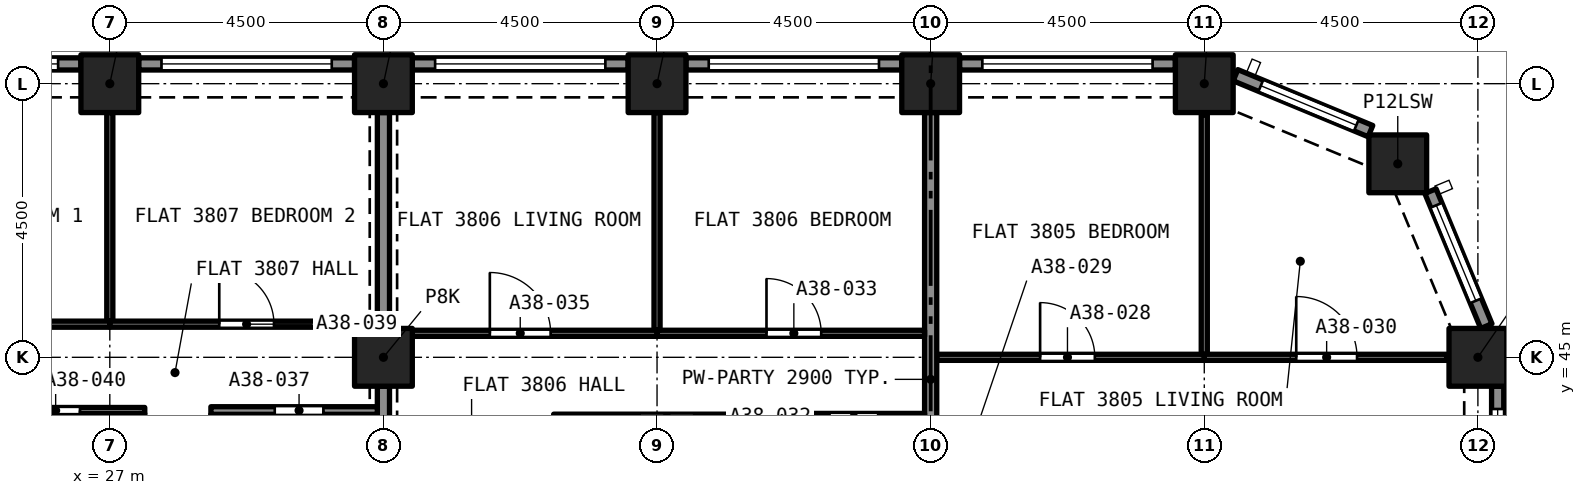
"""IFC4 building model, lengths in metres.
Left out: names, types, materials, properties, quantities, classifications, styles, units other than length and angle.
Written with IfcOpenShell. Run it as: python <this file> out.ifc"""

import sys

from ifc_helpers import new_model, si_unit, direction, frame, frame_2d, origin, origin_2d, place, context, subcontext, project, spatial, rectangle, extrude, element, fill, save


model = new_model("IFC4")
c1 = context("Model", 3, precision=1e-05, world=origin(), true_north=direction((0.0, 1.0)))
c2 = subcontext(c1, "Body", "Model", "MODEL_VIEW")
j1 = project(units=[si_unit("LENGTHUNIT", "METRE"), si_unit("PLANEANGLEUNIT", "RADIAN")], contexts=[c1])
p1 = place(None, origin())
s1 = spatial("IfcSite", under=j1, at=p1, CompositionType="ELEMENT")
p2 = place(p1, origin())
s2 = spatial("IfcBuilding", under=s1, at=p2, CompositionType="ELEMENT")
p3 = place(p2, frame((0.0, 0.0, 136.6)))
s3 = spatial("IfcBuildingStorey", under=s2, at=p3, CompositionType="ELEMENT", Elevation=136.6)
for number, where, z_axis, x_axis in (
    (1, (31.5, 45.0, 0.0), (0.0, 0.0, 1.0), (1.0, 0.0, 0.0)),
    (2, (49.5, 45.0, 0.0), (0.0, 0.0, 1.0), (1.0, 0.0, 0.0)),
    (3, (48.182, 48.182, 0.0), (0.0, 0.0, 1.0), (1.0, 0.0, 0.0)),
    (4, (27.0, 49.5, 0.0), (0.0, 0.0, 1.0), (1.0, 0.0, 0.0)),
    (5, (31.5, 49.5, 0.0), (0.0, 0.0, 1.0), (1.0, 0.0, 0.0)),
    (6, (36.0, 49.5, 0.0), (0.0, 0.0, 1.0), (1.0, 0.0, 0.0)),
    (7, (40.5, 49.5, 0.0), (0.0, 0.0, 1.0), (1.0, 0.0, 0.0)),
    (8, (45.0, 49.5, 0.0), (0.0, 0.0, 1.0), (1.0, 0.0, 0.0)),
):
    element("IfcColumn", number, at=place(p3, frame(where, z_axis=z_axis, x_axis=x_axis)), inside=s3, PredefinedType="COLUMN", context=c2, shape_type="SweptSolid", body=[
        extrude(rectangle(XDim=0.95, YDim=0.95, at=origin_2d()), origin(), (0.0, 0.0, 1.0), 3.2),
    ])
p4 = place(p3, frame((49.825, 44.525, 0.0), z_axis=(0.0, 0.0, 1.0), x_axis=(0.0, -1.0, 0.0)))
e9 = element("IfcWall", 9, at=p4, inside=s3, PredefinedType="SOLIDWALL", context=c2, shape_type="SweptSolid", body=[
    extrude(rectangle(XDim=3.55, YDim=0.2, at=frame_2d((1.775, 0.0))), origin(), (0.0, 0.0, 1.0), 3.2),
])
p5 = place(p4, frame((0.375, 0.0, 0.45)))
e10 = element("IfcOpeningElement", 10, at=p5, cuts=e9, PredefinedType="OPENING", context=c2, shape_type="SweptSolid", body=[
    extrude(rectangle(XDim=2.8, YDim=1.95, at=frame_2d((1.4, 0.975))), frame((0.0, 0.11, 0.0), z_axis=(0.0, -1.0, 0.0), x_axis=(1.0, 0.0, 0.0)), (0.0, 0.0, 1.0), 0.22),
])
p6 = place(p3, frame((48.72, 47.733, 0.0), z_axis=(0.0, 0.0, 1.0), x_axis=(0.382680855588, -0.923880599843, 0.0)))
e11 = element("IfcWall", 11, at=p6, inside=s3, PredefinedType="SOLIDWALL", context=c2, shape_type="SweptSolid", body=[
    extrude(rectangle(XDim=2.403, YDim=0.2, at=frame_2d((1.201, 0.0))), origin(), (0.0, 0.0, 1.0), 3.2),
])
p7 = place(p6, frame((0.251, 0.0, 0.45)))
e12 = element("IfcOpeningElement", 12, at=p7, cuts=e11, PredefinedType="OPENING", context=c2, shape_type="SweptSolid", body=[
    extrude(rectangle(XDim=1.7, YDim=1.95, at=frame_2d((0.85, 0.975))), frame((0.0, 0.11, 0.0), z_axis=(0.0, -1.0, 0.0), x_axis=(1.0, 0.0, 0.0)), (0.0, 0.0, 1.0), 0.22),
])
p8 = place(p3, frame((45.513, 49.639, 0.0), z_axis=(0.0, 0.0, 1.0), x_axis=(0.923880599843, -0.382680855588, 0.0)))
e13 = element("IfcWall", 13, at=p8, inside=s3, PredefinedType="SOLIDWALL", context=c2, shape_type="SweptSolid", body=[
    extrude(rectangle(XDim=2.403, YDim=0.2, at=frame_2d((1.201, 0.0))), origin(), (0.0, 0.0, 1.0), 3.2),
])
p9 = place(p8, frame((0.451, 0.0, 0.45)))
e14 = element("IfcOpeningElement", 14, at=p9, cuts=e13, PredefinedType="OPENING", context=c2, shape_type="SweptSolid", body=[
    extrude(rectangle(XDim=1.7, YDim=1.95, at=frame_2d((0.85, 0.975))), frame((0.0, 0.11, 0.0), z_axis=(0.0, -1.0, 0.0), x_axis=(1.0, 0.0, 0.0)), (0.0, 0.0, 1.0), 0.22),
])
p10 = place(p3, frame((40.975, 49.825, 0.0), z_axis=(0.0, 0.0, 1.0), x_axis=(1.0, 0.0, 0.0)))
e15 = element("IfcWall", 15, at=p10, inside=s3, PredefinedType="SOLIDWALL", context=c2, shape_type="SweptSolid", body=[
    extrude(rectangle(XDim=3.55, YDim=0.2, at=frame_2d((1.775, 0.0))), origin(), (0.0, 0.0, 1.0), 3.2),
])
p11 = place(p10, frame((0.375, 0.0, 0.45)))
e16 = element("IfcOpeningElement", 16, at=p11, cuts=e15, PredefinedType="OPENING", context=c2, shape_type="SweptSolid", body=[
    extrude(rectangle(XDim=2.8, YDim=1.95, at=frame_2d((1.4, 0.975))), frame((0.0, 0.11, 0.0), z_axis=(0.0, -1.0, 0.0), x_axis=(1.0, 0.0, 0.0)), (0.0, 0.0, 1.0), 0.22),
])
p12 = place(p3, frame((36.475, 49.825, 0.0), z_axis=(0.0, 0.0, 1.0), x_axis=(1.0, 0.0, 0.0)))
e17 = element("IfcWall", 17, at=p12, inside=s3, PredefinedType="SOLIDWALL", context=c2, shape_type="SweptSolid", body=[
    extrude(rectangle(XDim=3.55, YDim=0.2, at=frame_2d((1.775, 0.0))), origin(), (0.0, 0.0, 1.0), 3.2),
])
p13 = place(p12, frame((0.375, 0.0, 0.45)))
e18 = element("IfcOpeningElement", 18, at=p13, cuts=e17, PredefinedType="OPENING", context=c2, shape_type="SweptSolid", body=[
    extrude(rectangle(XDim=2.8, YDim=1.95, at=frame_2d((1.4, 0.975))), frame((0.0, 0.11, 0.0), z_axis=(0.0, -1.0, 0.0), x_axis=(1.0, 0.0, 0.0)), (0.0, 0.0, 1.0), 0.22),
])
p14 = place(p3, frame((31.975, 49.825, 0.0), z_axis=(0.0, 0.0, 1.0), x_axis=(1.0, 0.0, 0.0)))
e19 = element("IfcWall", 19, at=p14, inside=s3, PredefinedType="SOLIDWALL", context=c2, shape_type="SweptSolid", body=[
    extrude(rectangle(XDim=3.55, YDim=0.2, at=frame_2d((1.775, 0.0))), origin(), (0.0, 0.0, 1.0), 3.2),
])
p15 = place(p14, frame((0.375, 0.0, 0.45)))
e20 = element("IfcOpeningElement", 20, at=p15, cuts=e19, PredefinedType="OPENING", context=c2, shape_type="SweptSolid", body=[
    extrude(rectangle(XDim=2.8, YDim=1.95, at=frame_2d((1.4, 0.975))), frame((0.0, 0.11, 0.0), z_axis=(0.0, -1.0, 0.0), x_axis=(1.0, 0.0, 0.0)), (0.0, 0.0, 1.0), 0.22),
])
p16 = place(p3, frame((27.475, 49.825, 0.0), z_axis=(0.0, 0.0, 1.0), x_axis=(1.0, 0.0, 0.0)))
e21 = element("IfcWall", 21, at=p16, inside=s3, PredefinedType="SOLIDWALL", context=c2, shape_type="SweptSolid", body=[
    extrude(rectangle(XDim=3.55, YDim=0.2, at=frame_2d((1.775, 0.0))), origin(), (0.0, 0.0, 1.0), 3.2),
])
p17 = place(p16, frame((0.375, 0.0, 0.45)))
e22 = element("IfcOpeningElement", 22, at=p17, cuts=e21, PredefinedType="OPENING", context=c2, shape_type="SweptSolid", body=[
    extrude(rectangle(XDim=2.8, YDim=1.95, at=frame_2d((1.4, 0.975))), frame((0.0, 0.11, 0.0), z_axis=(0.0, -1.0, 0.0), x_axis=(1.0, 0.0, 0.0)), (0.0, 0.0, 1.0), 0.22),
])
p18 = place(p3, frame((22.975, 49.825, 0.0), z_axis=(0.0, 0.0, 1.0), x_axis=(1.0, 0.0, 0.0)))
e23 = element("IfcWall", 23, at=p18, inside=s3, PredefinedType="SOLIDWALL", context=c2, shape_type="SweptSolid", body=[
    extrude(rectangle(XDim=3.55, YDim=0.2, at=frame_2d((1.775, 0.0))), origin(), (0.0, 0.0, 1.0), 3.2),
])
p19 = place(p18, frame((0.375, 0.0, 0.45)))
e24 = element("IfcOpeningElement", 24, at=p19, cuts=e23, PredefinedType="OPENING", context=c2, shape_type="SweptSolid", body=[
    extrude(rectangle(XDim=2.8, YDim=1.95, at=frame_2d((1.4, 0.975))), frame((0.0, 0.11, 0.0), z_axis=(0.0, -1.0, 0.0), x_axis=(1.0, 0.0, 0.0)), (0.0, 0.0, 1.0), 0.22),
])
p20 = place(p3, frame((40.6, 45.0, 0.0), z_axis=(0.0, 0.0, 1.0), x_axis=(1.0, 0.0, 0.0)))
e25 = element("IfcWall", 25, at=p20, inside=s3, PredefinedType="PARTITIONING", context=c2, shape_type="SweptSolid", body=[
    extrude(rectangle(XDim=4.4, YDim=0.1, at=frame_2d((2.2, 0.0))), origin(), (0.0, 0.0, 1.0), 2.9),
])
p21 = place(p20, frame((1.7, 0.0, 0.0)))
e26 = element("IfcOpeningElement", 26, at=p21, cuts=e25, PredefinedType="OPENING", context=c2, shape_type="SweptSolid", body=[
    extrude(rectangle(XDim=0.9, YDim=2.1, at=frame_2d((0.45, 1.05))), frame((0.0, 0.06, 0.0), z_axis=(0.0, -1.0, 0.0), x_axis=(1.0, 0.0, 0.0)), (0.0, 0.0, 1.0), 0.12),
])
p22 = place(p3, frame((45.0, 45.05, 0.0), z_axis=(0.0, 0.0, 1.0), x_axis=(0.0, 1.0, 0.0)))
e27 = element("IfcWall", 27, at=p22, inside=s3, PredefinedType="PARTITIONING", context=c2, shape_type="SweptSolid", body=[
    extrude(rectangle(XDim=3.936, YDim=0.1, at=frame_2d((1.968, 0.0))), origin(), (0.0, 0.0, 1.0), 2.9),
])
p23 = place(p3, frame((45.0, 45.0, 0.0), z_axis=(0.0, 0.0, 1.0), x_axis=(1.0, 0.0, 0.0)))
e28 = element("IfcWall", 28, at=p23, inside=s3, PredefinedType="PARTITIONING", context=c2, shape_type="SweptSolid", body=[
    extrude(rectangle(XDim=3.986, YDim=0.1, at=frame_2d((1.993, 0.0))), origin(), (0.0, 0.0, 1.0), 2.9),
])
p24 = place(p23, frame((1.512, 0.0, 0.0)))
e29 = element("IfcOpeningElement", 29, at=p24, cuts=e28, PredefinedType="OPENING", context=c2, shape_type="SweptSolid", body=[
    extrude(rectangle(XDim=1.0, YDim=2.1, at=frame_2d((0.5, 1.05))), frame((0.0, 0.06, 0.0), z_axis=(0.0, -1.0, 0.0), x_axis=(1.0, 0.0, 0.0)), (0.0, 0.0, 1.0), 0.12),
])
p25 = place(p3, frame((40.5, 40.25, 0.0), z_axis=(0.0, 0.0, 1.0), x_axis=(0.0, 1.0, 0.0)))
e30 = element("IfcWall", 30, at=p25, inside=s3, PredefinedType="PARTITIONING", context=c2, shape_type="SweptSolid", body=[
    extrude(rectangle(XDim=8.775, YDim=0.2, at=frame_2d((4.387, 0.0))), origin(), (0.0, 0.0, 1.0), 2.9),
])
p26 = place(p3, frame((40.4, 44.015, 0.0), z_axis=(0.0, 0.0, 1.0), x_axis=(-1.0, 0.0, 0.0)))
e31 = element("IfcWall", 31, at=p26, inside=s3, PredefinedType="PARTITIONING", context=c2, shape_type="SweptSolid", body=[
    extrude(rectangle(XDim=2.427, YDim=0.125, at=frame_2d((1.214, 0.0))), origin(), (0.0, 0.0, 1.0), 2.9),
])
p27 = place(p26, frame((0.764, 0.0, 0.0)))
e32 = element("IfcOpeningElement", 32, at=p27, cuts=e31, PredefinedType="OPENING", context=c2, shape_type="SweptSolid", body=[
    extrude(rectangle(XDim=0.8, YDim=2.1, at=frame_2d((0.4, 1.05))), frame((0.0, 0.073, 0.0), z_axis=(0.0, -1.0, 0.0), x_axis=(1.0, 0.0, 0.0)), (0.0, 0.0, 1.0), 0.145),
])
p28 = place(p3, frame((36.0, 45.395, 0.0), z_axis=(0.0, 0.0, 1.0), x_axis=(1.0, 0.0, 0.0)))
e33 = element("IfcWall", 33, at=p28, inside=s3, PredefinedType="PARTITIONING", context=c2, shape_type="SweptSolid", body=[
    extrude(rectangle(XDim=4.4, YDim=0.1, at=frame_2d((2.2, 0.0))), origin(), (0.0, 0.0, 1.0), 2.9),
])
p29 = place(p28, frame((1.8, 0.0, 0.0)))
e34 = element("IfcOpeningElement", 34, at=p29, cuts=e33, PredefinedType="OPENING", context=c2, shape_type="SweptSolid", body=[
    extrude(rectangle(XDim=0.9, YDim=2.1, at=frame_2d((0.45, 1.05))), frame((0.0, 0.06, 0.0), z_axis=(0.0, -1.0, 0.0), x_axis=(1.0, 0.0, 0.0)), (0.0, 0.0, 1.0), 0.12),
])
p30 = place(p3, frame((36.0, 45.445, 0.0), z_axis=(0.0, 0.0, 1.0), x_axis=(0.0, 1.0, 0.0)))
e35 = element("IfcWall", 35, at=p30, inside=s3, PredefinedType="PARTITIONING", context=c2, shape_type="SweptSolid", body=[
    extrude(rectangle(XDim=3.58, YDim=0.1, at=frame_2d((1.79, 0.0))), origin(), (0.0, 0.0, 1.0), 2.9),
])
p31 = place(p3, frame((37.973, 44.015, 0.0), z_axis=(0.0, 0.0, 1.0), x_axis=(-1.0, 0.0, 0.0)))
e36 = element("IfcWall", 36, at=p31, inside=s3, PredefinedType="PARTITIONING", context=c2, shape_type="SweptSolid", body=[
    extrude(rectangle(XDim=3.673, YDim=0.1, at=frame_2d((1.836, 0.0))), origin(), (0.0, 0.0, 1.0), 2.9),
])
p32 = place(p31, frame((1.361, 0.0, 0.0)))
e37 = element("IfcOpeningElement", 37, at=p32, cuts=e36, PredefinedType="OPENING", context=c2, shape_type="SweptSolid", body=[
    extrude(rectangle(XDim=0.9, YDim=2.1, at=frame_2d((0.45, 1.05))), frame((0.0, 0.06, 0.0), z_axis=(0.0, -1.0, 0.0), x_axis=(1.0, 0.0, 0.0)), (0.0, 0.0, 1.0), 0.12),
])
p33 = place(p3, frame((31.975, 45.395, 0.0), z_axis=(0.0, 0.0, 1.0), x_axis=(1.0, 0.0, 0.0)))
e38 = element("IfcWall", 38, at=p33, inside=s3, PredefinedType="PARTITIONING", context=c2, shape_type="SweptSolid", body=[
    extrude(rectangle(XDim=4.025, YDim=0.1, at=frame_2d((2.012, 0.0))), origin(), (0.0, 0.0, 1.0), 2.9),
])
p34 = place(p33, frame((1.275, 0.0, 0.0)))
e39 = element("IfcOpeningElement", 39, at=p34, cuts=e38, PredefinedType="OPENING", context=c2, shape_type="SweptSolid", body=[
    extrude(rectangle(XDim=1.0, YDim=2.1, at=frame_2d((0.5, 1.05))), frame((0.0, 0.06, 0.0), z_axis=(0.0, -1.0, 0.0), x_axis=(1.0, 0.0, 0.0)), (0.0, 0.0, 1.0), 0.12),
])
p35 = place(p3, frame((31.5, 40.975, 0.0), z_axis=(0.0, 0.0, 1.0), x_axis=(0.0, 1.0, 0.0)))
e40 = element("IfcWall", 40, at=p35, inside=s3, PredefinedType="PARTITIONING", context=c2, shape_type="SweptSolid", body=[
    extrude(rectangle(XDim=3.55, YDim=0.2, at=frame_2d((1.775, 0.0))), origin(), (0.0, 0.0, 1.0), 2.38),
])
p36 = place(p3, frame((31.5, 45.495, 0.0), z_axis=(0.0, 0.0, 1.0), x_axis=(0.0, 1.0, 0.0)))
e41 = element("IfcWall", 41, at=p36, inside=s3, PredefinedType="PARTITIONING", context=c2, shape_type="SweptSolid", body=[
    extrude(rectangle(XDim=3.53, YDim=0.2, at=frame_2d((1.765, 0.0))), origin(), (0.0, 0.0, 1.0), 2.38),
])
p37 = place(p3, frame((28.725, 40.1, 0.0), z_axis=(0.0, 0.0, 1.0), x_axis=(0.0, 1.0, 0.0)))
e42 = element("IfcWall", 42, at=p37, inside=s3, PredefinedType="PARTITIONING", context=c2, shape_type="SweptSolid", body=[
    extrude(rectangle(XDim=3.962, YDim=0.125, at=frame_2d((1.981, 0.0))), origin(), (0.0, 0.0, 1.0), 2.75),
])
p38 = place(p3, frame((31.4, 44.125, 0.0), z_axis=(0.0, 0.0, 1.0), x_axis=(-1.0, 0.0, 0.0)))
e43 = element("IfcWall", 43, at=p38, inside=s3, PredefinedType="PARTITIONING", context=c2, shape_type="SweptSolid", body=[
    extrude(rectangle(XDim=2.737, YDim=0.125, at=frame_2d((1.369, 0.0))), origin(), (0.0, 0.0, 1.0), 2.75),
])
p39 = place(p38, frame((0.887, 0.0, 0.0)))
e44 = element("IfcOpeningElement", 44, at=p39, cuts=e43, PredefinedType="OPENING", context=c2, shape_type="SweptSolid", body=[
    extrude(rectangle(XDim=0.8, YDim=2.1, at=frame_2d((0.4, 1.05))), frame((0.0, 0.073, 0.0), z_axis=(0.0, -1.0, 0.0), x_axis=(1.0, 0.0, 0.0)), (0.0, 0.0, 1.0), 0.145),
])
p40 = place(p3, frame((27.0, 45.595, 0.0), z_axis=(0.0, 0.0, 1.0), x_axis=(0.0, 1.0, 0.0)))
e45 = element("IfcWall", 45, at=p40, inside=s3, PredefinedType="PARTITIONING", context=c2, shape_type="SweptSolid", body=[
    extrude(rectangle(XDim=3.43, YDim=0.1, at=frame_2d((1.715, 0.0))), origin(), (0.0, 0.0, 1.0), 2.75),
])
p41 = place(p3, frame((22.5, 45.545, 0.0), z_axis=(0.0, 0.0, 1.0), x_axis=(1.0, 0.0, 0.0)))
e46 = element("IfcWall", 46, at=p41, inside=s3, PredefinedType="PARTITIONING", context=c2, shape_type="SweptSolid", body=[
    extrude(rectangle(XDim=4.5, YDim=0.1, at=frame_2d((2.25, 0.0))), origin(), (0.0, 0.0, 1.0), 2.75),
])
p42 = place(p41, frame((1.8, 0.0, 0.0)))
e47 = element("IfcOpeningElement", 47, at=p42, cuts=e46, PredefinedType="OPENING", context=c2, shape_type="SweptSolid", body=[
    extrude(rectangle(XDim=0.9, YDim=2.1, at=frame_2d((0.45, 1.05))), frame((0.0, 0.06, 0.0), z_axis=(0.0, -1.0, 0.0), x_axis=(1.0, 0.0, 0.0)), (0.0, 0.0, 1.0), 0.12),
])
p43 = place(p3, frame((27.0, 45.545, 0.0), z_axis=(0.0, 0.0, 1.0), x_axis=(1.0, 0.0, 0.0)))
e48 = element("IfcWall", 48, at=p43, inside=s3, PredefinedType="PARTITIONING", context=c2, shape_type="SweptSolid", body=[
    extrude(rectangle(XDim=4.4, YDim=0.1, at=frame_2d((2.2, 0.0))), origin(), (0.0, 0.0, 1.0), 2.75),
])
p44 = place(p43, frame((1.8, 0.0, 0.0)))
e49 = element("IfcOpeningElement", 49, at=p44, cuts=e48, PredefinedType="OPENING", context=c2, shape_type="SweptSolid", body=[
    extrude(rectangle(XDim=0.9, YDim=2.1, at=frame_2d((0.45, 1.05))), frame((0.0, 0.06, 0.0), z_axis=(0.0, -1.0, 0.0), x_axis=(1.0, 0.0, 0.0)), (0.0, 0.0, 1.0), 0.12),
])
p45 = place(p3, frame((27.575, 44.125, 0.0), z_axis=(0.0, 0.0, 1.0), x_axis=(-1.0, 0.0, 0.0)))
e50 = element("IfcWall", 50, at=p45, inside=s3, PredefinedType="PARTITIONING", context=c2, shape_type="SweptSolid", body=[
    extrude(rectangle(XDim=2.881, YDim=0.1, at=frame_2d((1.44, 0.0))), origin(), (0.0, 0.0, 1.0), 2.75),
])
p46 = place(p45, frame((1.066, 0.0, 0.0)))
e51 = element("IfcOpeningElement", 51, at=p46, cuts=e50, PredefinedType="OPENING", context=c2, shape_type="SweptSolid", body=[
    extrude(rectangle(XDim=0.8, YDim=2.1, at=frame_2d((0.4, 1.05))), frame((0.0, 0.06, 0.0), z_axis=(0.0, -1.0, 0.0), x_axis=(1.0, 0.0, 0.0)), (0.0, 0.0, 1.0), 0.12),
])
p47 = place(p3, frame((27.525, 40.1, 0.0), z_axis=(0.0, 0.0, 1.0), x_axis=(0.0, 1.0, 0.0)))
e52 = element("IfcWall", 52, at=p47, inside=s3, PredefinedType="PARTITIONING", context=c2, shape_type="SweptSolid", body=[
    extrude(rectangle(XDim=3.975, YDim=0.1, at=frame_2d((1.987, 0.0))), origin(), (0.0, 0.0, 1.0), 2.75),
])
p48 = place(p5, origin())
e53 = element("IfcWindow", 53, at=p48, inside=s3, PartitioningType="SINGLE_PANEL", PredefinedType="WINDOW", context=c2, shape_type="SweptSolid", body=[
    extrude(rectangle(XDim=2.8, YDim=1.95, at=frame_2d((1.4, 0.975))), frame((0.0, 0.03, 0.0), z_axis=(0.0, -1.0, 0.0), x_axis=(1.0, 0.0, 0.0)), (0.0, 0.0, 1.0), 0.06),
])
fill(e10, e53)
p49 = place(p7, origin())
e54 = element("IfcWindow", 54, at=p49, inside=s3, PartitioningType="SINGLE_PANEL", PredefinedType="WINDOW", context=c2, shape_type="SweptSolid", body=[
    extrude(rectangle(XDim=1.7, YDim=1.95, at=frame_2d((0.85, 0.975))), frame((0.0, 0.03, 0.0), z_axis=(0.0, -1.0, 0.0), x_axis=(1.0, 0.0, 0.0)), (0.0, 0.0, 1.0), 0.06),
])
fill(e12, e54)
p50 = place(p9, origin())
e55 = element("IfcWindow", 55, at=p50, inside=s3, PartitioningType="SINGLE_PANEL", PredefinedType="WINDOW", context=c2, shape_type="SweptSolid", body=[
    extrude(rectangle(XDim=1.7, YDim=1.95, at=frame_2d((0.85, 0.975))), frame((0.0, 0.03, 0.0), z_axis=(0.0, -1.0, 0.0), x_axis=(1.0, 0.0, 0.0)), (0.0, 0.0, 1.0), 0.06),
])
fill(e14, e55)
p51 = place(p11, origin())
e56 = element("IfcWindow", 56, at=p51, inside=s3, PartitioningType="SINGLE_PANEL", PredefinedType="WINDOW", context=c2, shape_type="SweptSolid", body=[
    extrude(rectangle(XDim=2.8, YDim=1.95, at=frame_2d((1.4, 0.975))), frame((0.0, 0.03, 0.0), z_axis=(0.0, -1.0, 0.0), x_axis=(1.0, 0.0, 0.0)), (0.0, 0.0, 1.0), 0.06),
])
fill(e16, e56)
p52 = place(p13, origin())
e57 = element("IfcWindow", 57, at=p52, inside=s3, PartitioningType="SINGLE_PANEL", PredefinedType="WINDOW", context=c2, shape_type="SweptSolid", body=[
    extrude(rectangle(XDim=2.8, YDim=1.95, at=frame_2d((1.4, 0.975))), frame((0.0, 0.03, 0.0), z_axis=(0.0, -1.0, 0.0), x_axis=(1.0, 0.0, 0.0)), (0.0, 0.0, 1.0), 0.06),
])
fill(e18, e57)
p53 = place(p15, origin())
e58 = element("IfcWindow", 58, at=p53, inside=s3, PartitioningType="SINGLE_PANEL", PredefinedType="WINDOW", context=c2, shape_type="SweptSolid", body=[
    extrude(rectangle(XDim=2.8, YDim=1.95, at=frame_2d((1.4, 0.975))), frame((0.0, 0.03, 0.0), z_axis=(0.0, -1.0, 0.0), x_axis=(1.0, 0.0, 0.0)), (0.0, 0.0, 1.0), 0.06),
])
fill(e20, e58)
p54 = place(p17, origin())
e59 = element("IfcWindow", 59, at=p54, inside=s3, PartitioningType="SINGLE_PANEL", PredefinedType="WINDOW", context=c2, shape_type="SweptSolid", body=[
    extrude(rectangle(XDim=2.8, YDim=1.95, at=frame_2d((1.4, 0.975))), frame((0.0, 0.03, 0.0), z_axis=(0.0, -1.0, 0.0), x_axis=(1.0, 0.0, 0.0)), (0.0, 0.0, 1.0), 0.06),
])
fill(e22, e59)
p55 = place(p19, origin())
e60 = element("IfcWindow", 60, at=p55, inside=s3, PartitioningType="SINGLE_PANEL", PredefinedType="WINDOW", context=c2, shape_type="SweptSolid", body=[
    extrude(rectangle(XDim=2.8, YDim=1.95, at=frame_2d((1.4, 0.975))), frame((0.0, 0.03, 0.0), z_axis=(0.0, -1.0, 0.0), x_axis=(1.0, 0.0, 0.0)), (0.0, 0.0, 1.0), 0.06),
])
fill(e24, e60)
p56 = place(p21, origin())
e61 = element("IfcDoor", 61, at=p56, inside=s3, OperationType="SINGLE_SWING_LEFT", PredefinedType="DOOR", context=c2, shape_type="SweptSolid", body=[
    extrude(rectangle(XDim=0.9, YDim=2.1, at=frame_2d((0.45, 1.05))), frame((0.0, 0.025, 0.0), z_axis=(0.0, -1.0, 0.0), x_axis=(1.0, 0.0, 0.0)), (0.0, 0.0, 1.0), 0.05),
])
fill(e26, e61)
p57 = place(p24, origin())
e62 = element("IfcDoor", 62, at=p57, inside=s3, OperationType="SINGLE_SWING_RIGHT", PredefinedType="DOOR", context=c2, shape_type="SweptSolid", body=[
    extrude(rectangle(XDim=1.0, YDim=2.1, at=frame_2d((0.5, 1.05))), frame((0.0, 0.025, 0.0), z_axis=(0.0, -1.0, 0.0), x_axis=(1.0, 0.0, 0.0)), (0.0, 0.0, 1.0), 0.05),
])
fill(e29, e62)
p58 = place(p29, origin())
e63 = element("IfcDoor", 63, at=p58, inside=s3, OperationType="SINGLE_SWING_RIGHT", PredefinedType="DOOR", context=c2, shape_type="SweptSolid", body=[
    extrude(rectangle(XDim=0.9, YDim=2.1, at=frame_2d((0.45, 1.05))), frame((0.0, 0.025, 0.0), z_axis=(0.0, -1.0, 0.0), x_axis=(1.0, 0.0, 0.0)), (0.0, 0.0, 1.0), 0.05),
])
fill(e34, e63)
p59 = place(p34, origin())
e64 = element("IfcDoor", 64, at=p59, inside=s3, OperationType="SINGLE_SWING_LEFT", PredefinedType="DOOR", context=c2, shape_type="SweptSolid", body=[
    extrude(rectangle(XDim=1.0, YDim=2.1, at=frame_2d((0.5, 1.05))), frame((0.0, 0.025, 0.0), z_axis=(0.0, -1.0, 0.0), x_axis=(1.0, 0.0, 0.0)), (0.0, 0.0, 1.0), 0.05),
])
fill(e39, e64)
p60 = place(p39, origin())
e65 = element("IfcDoor", 65, at=p60, inside=s3, OperationType="SINGLE_SWING_LEFT", PredefinedType="DOOR", context=c2, shape_type="SweptSolid", body=[
    extrude(rectangle(XDim=0.8, YDim=2.1, at=frame_2d((0.4, 1.05))), frame((0.0, 0.025, 0.0), z_axis=(0.0, -1.0, 0.0), x_axis=(1.0, 0.0, 0.0)), (0.0, 0.0, 1.0), 0.05),
])
fill(e44, e65)
p61 = place(p44, origin())
e66 = element("IfcDoor", 66, at=p61, inside=s3, OperationType="SINGLE_SWING_RIGHT", PredefinedType="DOOR", context=c2, shape_type="SweptSolid", body=[
    extrude(rectangle(XDim=0.9, YDim=2.1, at=frame_2d((0.45, 1.05))), frame((0.0, 0.025, 0.0), z_axis=(0.0, -1.0, 0.0), x_axis=(1.0, 0.0, 0.0)), (0.0, 0.0, 1.0), 0.05),
])
fill(e49, e66)
p62 = place(p46, origin())
e67 = element("IfcDoor", 67, at=p62, inside=s3, OperationType="SINGLE_SWING_RIGHT", PredefinedType="DOOR", context=c2, shape_type="SweptSolid", body=[
    extrude(rectangle(XDim=0.8, YDim=2.1, at=frame_2d((0.4, 1.05))), frame((0.0, 0.025, 0.0), z_axis=(0.0, -1.0, 0.0), x_axis=(1.0, 0.0, 0.0)), (0.0, 0.0, 1.0), 0.05),
])
fill(e51, e67)
save(model, sys.argv[1])
